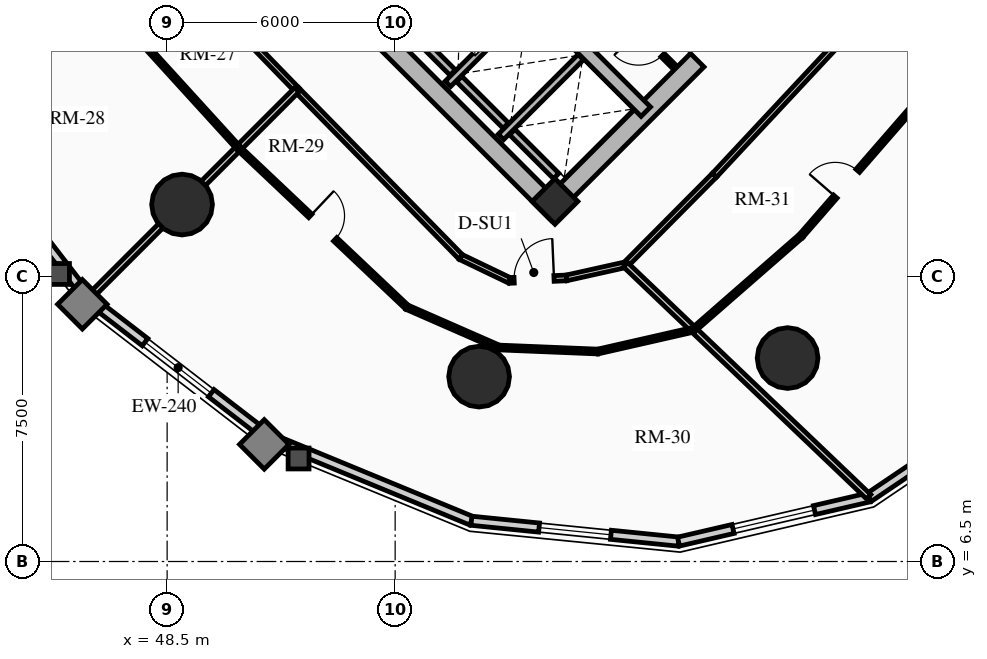
"""IFC4 building model, lengths in metres.
Left out: names, types, materials, properties, quantities, classifications, styles, units other than length and angle.
Written with IfcOpenShell. Run it as: python <this file> out.ifc"""

import sys

from ifc_helpers import new_model, si_unit, direction, frame, frame_2d, origin, origin_2d, place, context, subcontext, project, spatial, rectangle, circle, extrude, source, transform, mapped, element, fill, save


model = new_model("IFC4")
c1 = context("Model", 3, precision=1e-05, world=origin(), true_north=direction((0.0, 1.0)))
c2 = subcontext(c1, "Body", "Model", "MODEL_VIEW")
j1 = project(units=[si_unit("LENGTHUNIT", "METRE"), si_unit("PLANEANGLEUNIT", "RADIAN")], contexts=[c1])
p1 = place(None, origin())
s1 = spatial("IfcSite", under=j1, at=p1, CompositionType="ELEMENT")
p2 = place(p1, origin())
s2 = spatial("IfcBuilding", under=s1, at=p2, CompositionType="ELEMENT")
p3 = place(p2, frame((0.0, 0.0, 56.92)))
s3 = spatial("IfcBuildingStorey", under=s2, at=p3, CompositionType="ELEMENT", Elevation=56.92)
p4 = place(p3, frame((58.773, 15.661, 0.0), z_axis=(0.0, 0.0, 1.0), x_axis=(-0.707106781187, 0.707106781187, 0.0)))
e1 = element("IfcWall", 1, at=p4, inside=s3, PredefinedType="SHEAR", context=c2, shape_type="SweptSolid", body=[
    extrude(rectangle(XDim=14.3, YDim=0.5, at=frame_2d((7.15, 0.0))), origin(), (0.0, 0.0, 1.0), 2.91),
])
p5 = place(p3, frame((58.596, 15.838, 0.0), z_axis=(0.0, 0.0, 1.0), x_axis=(0.707106781187, 0.707106781187, 0.0)))
e2 = element("IfcWall", 2, at=p5, inside=s3, PredefinedType="SHEAR", context=c2, shape_type="SweptSolid", body=[
    extrude(rectangle(XDim=10.7, YDim=0.5, at=frame_2d((5.35, 0.0))), origin(), (0.0, 0.0, 1.0), 2.91),
])
m1 = source(origin(), c2, "Body", "SweptSolid", [
    extrude(rectangle(XDim=1.5, YDim=2.02, at=frame_2d((0.75, 1.01))), frame((0.0, 0.26, 0.0), z_axis=(0.0, -1.0, 0.0), x_axis=(1.0, 0.0, 0.0)), (0.0, 0.0, 1.0), 0.52),
])
p6 = place(p5, frame((5.45, 0.0, 0.0)))
e3 = element("IfcOpeningElement", 3, at=p6, cuts=e2, PredefinedType="OPENING", context=c2, shape_type="MappedRepresentation", body=[
    mapped(m1, transform((0.0, 0.0, 0.0), x_axis=(1.0, 0.0, 0.0), y_axis=(0.0, 1.0, 0.0), z_axis=(0.0, 0.0, 1.0), scale=1.0)),
])
p7 = place(p3, frame((61.096, 18.338, 0.0), z_axis=(0.0, 0.0, 1.0), x_axis=(-0.707106781187, 0.707106781187, 0.0)))
e4 = element("IfcWall", 4, at=p7, inside=s3, PredefinedType="SHEAR", context=c2, shape_type="SweptSolid", body=[
    extrude(rectangle(XDim=13.8, YDim=0.35, at=frame_2d((6.9, 0.0))), origin(), (0.0, 0.0, 1.0), 2.91),
])
m2 = source(origin(), c2, "Body", "SweptSolid", [
    extrude(rectangle(XDim=1.1, YDim=2.015, at=frame_2d((0.55, 1.007))), frame((0.0, 0.185, 0.0), z_axis=(0.0, -1.0, 0.0), x_axis=(1.0, 0.0, 0.0)), (0.0, 0.0, 1.0), 0.37),
])
p8 = place(p7, frame((4.9, 0.0, 0.0)))
e5 = element("IfcOpeningElement", 5, at=p8, cuts=e4, PredefinedType="OPENING", context=c2, shape_type="MappedRepresentation", body=[
    mapped(m2, transform((0.0, 0.0, 0.0), x_axis=(1.0, 0.0, 0.0), y_axis=(0.0, 1.0, 0.0), z_axis=(0.0, 0.0, 1.0), scale=1.0)),
])
m3 = source(origin(), c2, "Body", "SweptSolid", [
    extrude(rectangle(XDim=1.15, YDim=2.02, at=frame_2d((0.575, 1.01))), frame((0.0, 0.185, 0.0), z_axis=(0.0, -1.0, 0.0), x_axis=(1.0, 0.0, 0.0)), (0.0, 0.0, 1.0), 0.37),
])
p9 = place(p7, frame((7.32, 0.0, 0.0)))
e6 = element("IfcOpeningElement", 6, at=p9, cuts=e4, PredefinedType="OPENING", context=c2, shape_type="MappedRepresentation", body=[
    mapped(m3, transform((0.0, 0.0, 0.0), x_axis=(1.0, 0.0, 0.0), y_axis=(0.0, 1.0, 0.0), z_axis=(0.0, 0.0, 1.0), scale=1.0)),
])
p10 = place(p3, frame((58.706, 15.976, 0.0), z_axis=(0.0, 0.0, 1.0), x_axis=(0.707106781187, 0.707106781187, 0.0)))
e7 = element("IfcColumn", 7, at=p10, inside=s3, PredefinedType="COLUMN", context=c2, shape_type="SweptSolid", body=[
    extrude(rectangle(XDim=0.85, YDim=0.85, at=origin_2d()), origin(), (0.0, 0.0, 1.0), 2.91),
])
for number, where, z_axis, x_axis in (
    (8, (48.893, 15.893, 0.0), (0.0, 0.0, 1.0), (1.0, 0.0, 0.0)),
    (9, (56.709, 11.365, 0.0), (0.0, 0.0, 1.0), (1.0, 0.0, 0.0)),
    (10, (64.827, 11.854, 0.0), (0.0, 0.0, 1.0), (1.0, 0.0, 0.0)),
):
    element("IfcColumn", number, at=place(p3, frame(where, z_axis=z_axis, x_axis=x_axis)), inside=s3, PredefinedType="USERDEFINED", context=c2, shape_type="SweptSolid", body=[
        extrude(circle(Radius=0.8, at=origin_2d()), origin(), (0.0, 0.0, 1.0), 2.91),
    ])
p11 = place(p3, frame((46.425, 13.425, 0.0), z_axis=(0.0, 0.0, 1.0), x_axis=(-0.610502519057, 0.792014314407, 0.0)))
e11 = element("IfcWall", 11, at=p11, inside=s3, PredefinedType="SOLIDWALL", context=c2, shape_type="SweptSolid", body=[
    extrude(rectangle(XDim=5.973, YDim=0.24, at=frame_2d((2.987, 0.0))), origin(), (0.0, 0.0, 1.0), 2.073),
])
p12 = place(p3, frame((51.156, 9.778, 0.0), z_axis=(0.0, 0.0, 1.0), x_axis=(-0.792014314407, 0.610502519057, 0.0)))
e12 = element("IfcWall", 12, at=p12, inside=s3, PredefinedType="SOLIDWALL", context=c2, shape_type="SweptSolid", body=[
    extrude(rectangle(XDim=5.973, YDim=0.24, at=frame_2d((2.987, 0.0))), origin(), (0.0, 0.0, 1.0), 2.073),
])
m4 = source(origin(), c2, "Body", "SweptSolid", [
    extrude(rectangle(XDim=2.2, YDim=1.35, at=frame_2d((1.1, 0.675))), frame((0.0, 0.13, 0.0), z_axis=(0.0, -1.0, 0.0), x_axis=(1.0, 0.0, 0.0)), (0.0, 0.0, 1.0), 0.26),
])
p13 = place(p12, frame((1.887, 0.0, 0.65)))
e13 = element("IfcOpeningElement", 13, at=p13, cuts=e12, PredefinedType="OPENING", context=c2, shape_type="MappedRepresentation", body=[
    mapped(m4, transform((0.0, 0.0, 0.0), x_axis=(1.0, 0.0, 0.0), y_axis=(0.0, 1.0, 0.0), z_axis=(0.0, 0.0, 1.0), scale=1.0)),
])
p14 = place(p3, frame((56.507, 7.572, 0.0), z_axis=(0.0, 0.0, 1.0), x_axis=(-0.924563629567, 0.381027682565, 0.0)))
e14 = element("IfcWall", 14, at=p14, inside=s3, PredefinedType="SOLIDWALL", context=c2, shape_type="SweptSolid", body=[
    extrude(rectangle(XDim=5.789, YDim=0.24, at=frame_2d((2.894, 0.0))), origin(), (0.0, 0.0, 1.0), 2.073),
])
p15 = place(p3, frame((61.957, 7.024, 0.0), z_axis=(0.0, 0.0, 1.0), x_axis=(-0.994970765694, 0.100165739718, 0.0)))
e15 = element("IfcWall", 15, at=p15, inside=s3, PredefinedType="SOLIDWALL", context=c2, shape_type="SweptSolid", body=[
    extrude(rectangle(XDim=5.477, YDim=0.24, at=frame_2d((2.738, 0.0))), origin(), (0.0, 0.0, 1.0), 2.073),
])
m5 = source(origin(), c2, "Body", "SweptSolid", [
    extrude(rectangle(XDim=1.9, YDim=1.35, at=frame_2d((0.95, 0.675))), frame((0.0, 0.13, 0.0), z_axis=(0.0, -1.0, 0.0), x_axis=(1.0, 0.0, 0.0)), (0.0, 0.0, 1.0), 0.26),
])
p16 = place(p15, frame((1.788, 0.0, 0.65)))
e16 = element("IfcOpeningElement", 16, at=p16, cuts=e15, PredefinedType="OPENING", context=c2, shape_type="MappedRepresentation", body=[
    mapped(m5, transform((0.0, 0.0, 0.0), x_axis=(1.0, 0.0, 0.0), y_axis=(0.0, 1.0, 0.0), z_axis=(0.0, 0.0, 1.0), scale=1.0)),
])
p17 = place(p3, frame((66.969, 8.186, 0.0), z_axis=(0.0, 0.0, 1.0), x_axis=(-0.974166016949, -0.225833060959, 0.0)))
e17 = element("IfcWall", 17, at=p17, inside=s3, PredefinedType="SOLIDWALL", context=c2, shape_type="SweptSolid", body=[
    extrude(rectangle(XDim=5.146, YDim=0.24, at=frame_2d((2.573, 0.0))), origin(), (0.0, 0.0, 1.0), 2.073),
])
p18 = place(p17, frame((1.473, 0.0, 0.65)))
e18 = element("IfcOpeningElement", 18, at=p18, cuts=e17, PredefinedType="OPENING", context=c2, shape_type="MappedRepresentation", body=[
    mapped(m4, transform((0.0, 0.0, 0.0), x_axis=(1.0, 0.0, 0.0), y_axis=(0.0, 1.0, 0.0), z_axis=(0.0, 0.0, 1.0), scale=1.0)),
])
p19 = place(p3, frame((71.055, 10.945, 0.0), z_axis=(0.0, 0.0, 1.0), x_axis=(-0.828736708604, -0.559638693991, 0.0)))
e19 = element("IfcWall", 19, at=p19, inside=s3, PredefinedType="SOLIDWALL", context=c2, shape_type="SweptSolid", body=[
    extrude(rectangle(XDim=4.93, YDim=0.24, at=frame_2d((2.465, 0.0))), origin(), (0.0, 0.0, 1.0), 2.073),
])
p20 = place(p3, frame((55.888, 19.069, 0.0), z_axis=(0.0, 0.0, 1.0), x_axis=(0.707106781187, 0.707106781187, 0.0)))
e20 = element("IfcWall", 20, at=p20, inside=s3, PredefinedType="SHEAR", context=c2, shape_type="SweptSolid", body=[
    extrude(rectangle(XDim=2.97, YDim=0.2, at=frame_2d((1.485, 0.0))), origin(), (0.0, 0.0, 1.0), 2.91),
])
p21 = place(p3, frame((56.015, 19.366, 0.0), z_axis=(0.0, 0.0, 1.0), x_axis=(-0.707106781187, 0.707106781187, 0.0)))
e21 = element("IfcWall", 21, at=p21, inside=s3, PredefinedType="SHEAR", context=c2, shape_type="SweptSolid", body=[
    extrude(rectangle(XDim=2.44, YDim=0.2, at=frame_2d((1.22, 0.0))), origin(), (0.0, 0.0, 1.0), 2.91),
])
p22 = place(p3, frame((57.284, 17.673, 0.0), z_axis=(0.0, 0.0, 1.0), x_axis=(0.707147878904, 0.70706568108, 0.0)))
e22 = element("IfcWall", 22, at=p22, inside=s3, PredefinedType="SHEAR", context=c2, shape_type="SweptSolid", body=[
    extrude(rectangle(XDim=2.97, YDim=0.2, at=frame_2d((1.485, 0.0))), origin(), (0.0, 0.0, 1.0), 2.91),
])
p23 = place(p3, frame((57.412, 17.97, 0.0), z_axis=(0.0, 0.0, 1.0), x_axis=(-0.707106781187, 0.707106781187, 0.0)))
e23 = element("IfcWall", 23, at=p23, inside=s3, PredefinedType="SHEAR", context=c2, shape_type="SweptSolid", body=[
    extrude(rectangle(XDim=1.735, YDim=0.2, at=frame_2d((0.867, 0.0))), origin(), (0.0, 0.0, 1.0), 2.91),
])
p24 = place(p3, frame((58.737, 16.644, 0.0), z_axis=(0.0, 0.0, 1.0), x_axis=(-0.707032117043, 0.707181437447, 0.0)))
e24 = element("IfcWall", 24, at=p24, inside=s3, PredefinedType="SHEAR", context=c2, shape_type="SweptSolid", body=[
    extrude(rectangle(XDim=1.635, YDim=0.2, at=frame_2d((0.817, 0.0))), origin(), (0.0, 0.0, 1.0), 2.91),
])
p25 = place(p3, frame((61.835, 19.529, 0.0), z_axis=(0.0, 0.0, 1.0), x_axis=(-0.707174592913, 0.707038962956, 0.0)))
e25 = element("IfcWall", 25, at=p25, inside=s3, PredefinedType="PARTITIONING", context=c2, shape_type="SweptSolid", body=[
    extrude(rectangle(XDim=1.8, YDim=0.125, at=frame_2d((0.9, 0.0))), origin(), (0.0, 0.0, 1.0), 2.635),
])
m6 = source(origin(), c2, "Body", "SweptSolid", [
    extrude(rectangle(XDim=0.9, YDim=2.005, at=frame_2d((0.45, 1.002))), frame((0.0, 0.073, 0.0), z_axis=(0.0, -1.0, 0.0), x_axis=(1.0, 0.0, 0.0)), (0.0, 0.0, 1.0), 0.145),
])
p26 = place(p25, frame((0.42, 0.0, 0.0)))
e26 = element("IfcOpeningElement", 26, at=p26, cuts=e25, PredefinedType="OPENING", context=c2, shape_type="MappedRepresentation", body=[
    mapped(m6, transform((0.0, 0.0, 0.0), x_axis=(1.0, 0.0, 0.0), y_axis=(0.0, 1.0, 0.0), z_axis=(0.0, 0.0, 1.0), scale=1.0)),
])
p27 = place(p3, frame((47.706, 23.253, 0.0), z_axis=(0.0, 0.0, 1.0), x_axis=(0.696179266346, -0.717867974707, 0.0)))
e27 = element("IfcWall", 27, at=p27, inside=s3, PredefinedType="PARTITIONING", context=c2, shape_type="SweptSolid", body=[
    extrude(rectangle(XDim=6.045, YDim=0.15, at=frame_2d((3.022, 0.0))), origin(), (0.0, 0.0, 1.0), 2.635),
])
p28 = place(p3, frame((51.914, 18.914, 0.0), z_axis=(0.0, 0.0, 1.0), x_axis=(0.699999313799, -0.714143515465, 0.0)))
e28 = element("IfcWall", 28, at=p28, inside=s3, PredefinedType="PARTITIONING", context=c2, shape_type="SweptSolid", body=[
    extrude(rectangle(XDim=6.162, YDim=0.15, at=frame_2d((3.081, 0.0))), origin(), (0.0, 0.0, 1.0), 2.159),
])
p29 = place(p3, frame((56.227, 14.513, 0.0), z_axis=(0.0, 0.0, 1.0), x_axis=(0.901477579283, -0.432825801044, 0.0)))
e29 = element("IfcWall", 29, at=p29, inside=s3, PredefinedType="PARTITIONING", context=c2, shape_type="SweptSolid", body=[
    extrude(rectangle(XDim=1.424, YDim=0.15, at=frame_2d((0.712, 0.0))), origin(), (0.0, 0.0, 1.0), 2.205),
])
p30 = place(p3, frame((57.511, 13.897, 0.0), z_axis=(0.0, 0.0, 1.0), x_axis=(0.999024538494, 0.044158481476, 0.0)))
e30 = element("IfcWall", 30, at=p30, inside=s3, PredefinedType="PARTITIONING", context=c2, shape_type="SweptSolid", body=[
    extrude(rectangle(XDim=1.498, YDim=0.15, at=frame_2d((0.749, 0.0))), origin(), (0.0, 0.0, 1.0), 2.159),
])
m7 = source(origin(), c2, "Body", "SweptSolid", [
    extrude(rectangle(XDim=1.05, YDim=2.015, at=frame_2d((0.525, 1.007))), frame((0.0, 0.085, 0.0), z_axis=(0.0, -1.0, 0.0), x_axis=(1.0, 0.0, 0.0)), (0.0, 0.0, 1.0), 0.17),
])
p31 = place(p30, frame((0.12, 0.0, 0.0)))
e31 = element("IfcOpeningElement", 31, at=p31, cuts=e30, PredefinedType="OPENING", context=c2, shape_type="MappedRepresentation", body=[
    mapped(m7, transform((0.0, 0.0, 0.0), x_axis=(1.0, 0.0, 0.0), y_axis=(0.0, 1.0, 0.0), z_axis=(0.0, 0.0, 1.0), scale=1.0)),
])
p32 = place(p3, frame((59.008, 13.963, 0.0), z_axis=(0.0, 0.0, 1.0), x_axis=(0.976020856791, 0.21767702476, 0.0)))
e32 = element("IfcWall", 32, at=p32, inside=s3, PredefinedType="PARTITIONING", context=c2, shape_type="SweptSolid", body=[
    extrude(rectangle(XDim=1.593, YDim=0.15, at=frame_2d((0.796, 0.0))), origin(), (0.0, 0.0, 1.0), 2.205),
])
p33 = place(p3, frame((60.562, 14.31, 0.0), z_axis=(0.0, 0.0, 1.0), x_axis=(0.704566236161, 0.709638230975, 0.0)))
e33 = element("IfcWall", 33, at=p33, inside=s3, PredefinedType="PARTITIONING", context=c2, shape_type="SweptSolid", body=[
    extrude(rectangle(XDim=3.321, YDim=0.15, at=frame_2d((1.661, 0.0))), origin(), (0.0, 0.0, 1.0), 2.159),
])
p34 = place(p3, frame((62.903, 16.667, 0.0), z_axis=(0.0, 0.0, 1.0), x_axis=(0.682371947497, 0.731005147225, 0.0)))
e34 = element("IfcWall", 34, at=p34, inside=s3, PredefinedType="PARTITIONING", context=c2, shape_type="SweptSolid", body=[
    extrude(rectangle(XDim=6.642, YDim=0.15, at=frame_2d((3.321, 0.0))), origin(), (0.0, 0.0, 1.0), 2.159),
])
p35 = place(p3, frame((51.914, 18.914, 0.0), z_axis=(0.0, 0.0, 1.0), x_axis=(-0.707106781187, -0.707106781187, 0.0)))
e35 = element("IfcWall", 35, at=p35, inside=s3, PredefinedType="PARTITIONING", context=c2, shape_type="SweptSolid", body=[
    extrude(rectangle(XDim=7.743, YDim=0.16, at=frame_2d((3.872, 0.0))), origin(), (0.0, 0.0, 1.0), 2.073),
])
p36 = place(p3, frame((60.562, 14.31, 0.0), z_axis=(0.0, 0.0, 1.0), x_axis=(0.723408813637, -0.690419936236, 0.0)))
e36 = element("IfcWall", 36, at=p36, inside=s3, PredefinedType="PARTITIONING", context=c2, shape_type="SweptSolid", body=[
    extrude(rectangle(XDim=8.844, YDim=0.16, at=frame_2d((4.422, 0.0))), origin(), (0.0, 0.0, 1.0), 2.073),
])
p37 = place(p3, frame((46.331, 21.828, 0.0), z_axis=(0.0, 0.0, 1.0), x_axis=(0.673296785471, -0.739372327501, 0.0)))
e37 = element("IfcWall", 37, at=p37, inside=s3, PredefinedType="PARTITIONING", context=c2, shape_type="SweptSolid", body=[
    extrude(rectangle(XDim=6.015, YDim=0.125, at=frame_2d((3.008, 0.0))), origin(), (0.0, 0.0, 1.0), 2.635),
])
p38 = place(p3, frame((50.381, 17.381, 0.0), z_axis=(0.0, 0.0, 1.0), x_axis=(0.726536500488, -0.687127872712, 0.0)))
e38 = element("IfcWall", 38, at=p38, inside=s3, PredefinedType="PARTITIONING", context=c2, shape_type="SweptSolid", body=[
    extrude(rectangle(XDim=6.096, YDim=0.125, at=frame_2d((3.048, 0.0))), origin(), (0.0, 0.0, 1.0), 2.159),
])
p39 = place(p38, frame((2.598, 0.0, 0.0)))
e39 = element("IfcOpeningElement", 39, at=p39, cuts=e38, PredefinedType="OPENING", context=c2, shape_type="MappedRepresentation", body=[
    mapped(m6, transform((0.0, 0.0, 0.0), x_axis=(1.0, 0.0, 0.0), y_axis=(0.0, 1.0, 0.0), z_axis=(0.0, 0.0, 1.0), scale=1.0)),
])
p40 = place(p3, frame((54.81, 13.192, 0.0), z_axis=(0.0, 0.0, 1.0), x_axis=(0.91595798127, -0.40127419123, 0.0)))
e40 = element("IfcWall", 40, at=p40, inside=s3, PredefinedType="PARTITIONING", context=c2, shape_type="SweptSolid", body=[
    extrude(rectangle(XDim=2.644, YDim=0.125, at=frame_2d((1.322, 0.0))), origin(), (0.0, 0.0, 1.0), 2.159),
])
p41 = place(p3, frame((57.231, 12.131, 0.0), z_axis=(0.0, 0.0, 1.0), x_axis=(0.999171636131, -0.040694490436, 0.0)))
e41 = element("IfcWall", 41, at=p41, inside=s3, PredefinedType="PARTITIONING", context=c2, shape_type="SweptSolid", body=[
    extrude(rectangle(XDim=2.604, YDim=0.125, at=frame_2d((1.302, 0.0))), origin(), (0.0, 0.0, 1.0), 2.635),
])
p42 = place(p3, frame((59.833, 12.025, 0.0), z_axis=(0.0, 0.0, 1.0), x_axis=(0.975011214108, 0.222155648959, 0.0)))
e42 = element("IfcWall", 42, at=p42, inside=s3, PredefinedType="PARTITIONING", context=c2, shape_type="SweptSolid", body=[
    extrude(rectangle(XDim=2.586, YDim=0.125, at=frame_2d((1.293, 0.0))), origin(), (0.0, 0.0, 1.0), 2.205),
])
p43 = place(p3, frame((62.354, 12.6, 0.0), z_axis=(0.0, 0.0, 1.0), x_axis=(0.75329750535, 0.657679913357, 0.0)))
e43 = element("IfcWall", 43, at=p43, inside=s3, PredefinedType="PARTITIONING", context=c2, shape_type="SweptSolid", body=[
    extrude(rectangle(XDim=3.753, YDim=0.125, at=frame_2d((1.877, 0.0))), origin(), (0.0, 0.0, 1.0), 2.159),
])
p44 = place(p3, frame((65.181, 15.068, 0.0), z_axis=(0.0, 0.0, 1.0), x_axis=(0.656272116637, 0.754524293131, 0.0)))
e44 = element("IfcWall", 44, at=p44, inside=s3, PredefinedType="PARTITIONING", context=c2, shape_type="SweptSolid", body=[
    extrude(rectangle(XDim=6.147, YDim=0.125, at=frame_2d((3.074, 0.0))), origin(), (0.0, 0.0, 1.0), 2.159),
])
p45 = place(p44, frame((1.372, 0.0, 0.0)))
e45 = element("IfcOpeningElement", 45, at=p45, cuts=e44, PredefinedType="OPENING", context=c2, shape_type="MappedRepresentation", body=[
    mapped(m6, transform((0.0, 0.0, 0.0), x_axis=(1.0, 0.0, 0.0), y_axis=(0.0, 1.0, 0.0), z_axis=(0.0, 0.0, 1.0), scale=1.0)),
])
m8 = source(origin(), c2, "Body", "SweptSolid", [
    extrude(rectangle(XDim=2.2, YDim=1.35, at=frame_2d((1.1, 0.675))), frame((0.0, 0.03, 0.0), z_axis=(0.0, -1.0, 0.0), x_axis=(1.0, 0.0, 0.0)), (0.0, 0.0, 1.0), 0.06),
])
p46 = place(p13, origin())
e46 = element("IfcWindow", 46, at=p46, inside=s3, PartitioningType="DOUBLE_PANEL_VERTICAL", PredefinedType="WINDOW", context=c2, shape_type="MappedRepresentation", body=[
    mapped(m8, transform((0.0, 0.0, 0.0), x_axis=(1.0, 0.0, 0.0), y_axis=(0.0, 1.0, 0.0), z_axis=(0.0, 0.0, 1.0), scale=1.0)),
])
fill(e13, e46)
m9 = source(origin(), c2, "Body", "SweptSolid", [
    extrude(rectangle(XDim=1.9, YDim=1.35, at=frame_2d((0.95, 0.675))), frame((0.0, 0.03, 0.0), z_axis=(0.0, -1.0, 0.0), x_axis=(1.0, 0.0, 0.0)), (0.0, 0.0, 1.0), 0.06),
])
p47 = place(p16, origin())
e47 = element("IfcWindow", 47, at=p47, inside=s3, PartitioningType="DOUBLE_PANEL_VERTICAL", PredefinedType="WINDOW", context=c2, shape_type="MappedRepresentation", body=[
    mapped(m9, transform((0.0, 0.0, 0.0), x_axis=(1.0, 0.0, 0.0), y_axis=(0.0, 1.0, 0.0), z_axis=(0.0, 0.0, 1.0), scale=1.0)),
])
fill(e16, e47)
p48 = place(p18, origin())
e48 = element("IfcWindow", 48, at=p48, inside=s3, PartitioningType="DOUBLE_PANEL_VERTICAL", PredefinedType="WINDOW", context=c2, shape_type="MappedRepresentation", body=[
    mapped(m8, transform((0.0, 0.0, 0.0), x_axis=(1.0, 0.0, 0.0), y_axis=(0.0, 1.0, 0.0), z_axis=(0.0, 0.0, 1.0), scale=1.0)),
])
fill(e18, e48)
m10 = source(origin(), c2, "Body", "SweptSolid", [
    extrude(rectangle(XDim=1.5, YDim=2.02, at=frame_2d((0.75, 1.01))), frame((0.0, 0.025, 0.0), z_axis=(0.0, -1.0, 0.0), x_axis=(1.0, 0.0, 0.0)), (0.0, 0.0, 1.0), 0.05),
])
p49 = place(p6, origin())
e49 = element("IfcDoor", 49, at=p49, inside=s3, OperationType="DOUBLE_DOOR_SINGLE_SWING", PredefinedType="DOOR", context=c2, shape_type="MappedRepresentation", body=[
    mapped(m10, transform((0.0, 0.0, 0.0), x_axis=(1.0, 0.0, 0.0), y_axis=(0.0, 1.0, 0.0), z_axis=(0.0, 0.0, 1.0), scale=1.0)),
])
fill(e3, e49)
m11 = source(origin(), c2, "Body", "SweptSolid", [
    extrude(rectangle(XDim=0.9, YDim=2.005, at=frame_2d((0.45, 1.002))), frame((0.0, 0.025, 0.0), z_axis=(0.0, -1.0, 0.0), x_axis=(1.0, 0.0, 0.0)), (0.0, 0.0, 1.0), 0.05),
])
p50 = place(p26, origin())
e50 = element("IfcDoor", 50, at=p50, inside=s3, OperationType="SINGLE_SWING_RIGHT", PredefinedType="DOOR", context=c2, shape_type="MappedRepresentation", body=[
    mapped(m11, transform((0.0, 0.0, 0.0), x_axis=(1.0, 0.0, 0.0), y_axis=(0.0, 1.0, 0.0), z_axis=(0.0, 0.0, 1.0), scale=1.0)),
])
fill(e26, e50)
m12 = source(origin(), c2, "Body", "SweptSolid", [
    extrude(rectangle(XDim=1.05, YDim=2.015, at=frame_2d((0.525, 1.007))), frame((0.0, 0.025, 0.0), z_axis=(0.0, -1.0, 0.0), x_axis=(1.0, 0.0, 0.0)), (0.0, 0.0, 1.0), 0.05),
])
p51 = place(p31, origin())
e51 = element("IfcDoor", 51, at=p51, inside=s3, OperationType="SINGLE_SWING_RIGHT", PredefinedType="DOOR", context=c2, shape_type="MappedRepresentation", body=[
    mapped(m12, transform((0.0, 0.0, 0.0), x_axis=(1.0, 0.0, 0.0), y_axis=(0.0, 1.0, 0.0), z_axis=(0.0, 0.0, 1.0), scale=1.0)),
])
fill(e31, e51)
p52 = place(p39, origin())
e52 = element("IfcDoor", 52, at=p52, inside=s3, OperationType="SINGLE_SWING_LEFT", PredefinedType="DOOR", context=c2, shape_type="MappedRepresentation", body=[
    mapped(m11, transform((0.0, 0.0, 0.0), x_axis=(1.0, 0.0, 0.0), y_axis=(0.0, 1.0, 0.0), z_axis=(0.0, 0.0, 1.0), scale=1.0)),
])
fill(e39, e52)
p53 = place(p45, origin())
e53 = element("IfcDoor", 53, at=p53, inside=s3, OperationType="SINGLE_SWING_LEFT", PredefinedType="DOOR", context=c2, shape_type="MappedRepresentation", body=[
    mapped(m11, transform((0.0, 0.0, 0.0), x_axis=(1.0, 0.0, 0.0), y_axis=(0.0, 1.0, 0.0), z_axis=(0.0, 0.0, 1.0), scale=1.0)),
])
fill(e45, e53)
save(model, sys.argv[1])
